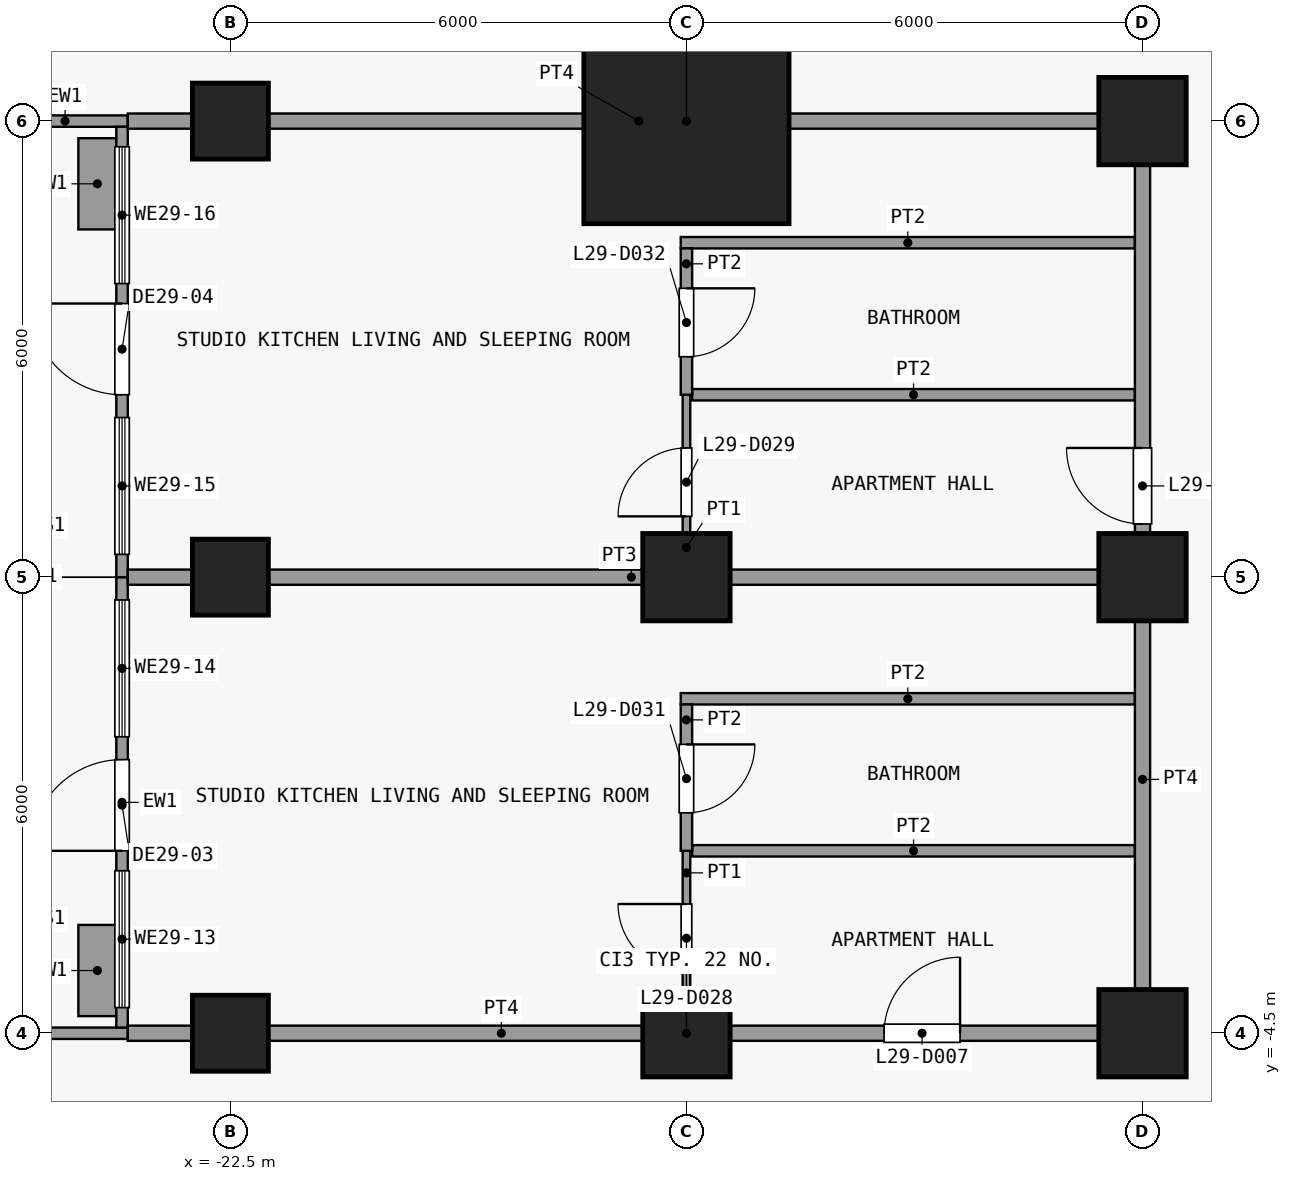
"""IFC4 building model, lengths in metres.
Left out: names, types, materials, properties, quantities, classifications, styles, units other than length and angle.
Written with IfcOpenShell. Run it as: python <this file> out.ifc"""

import sys

from ifc_helpers import new_model, si_unit, direction, frame, frame_2d, origin, origin_2d, place, context, subcontext, project, spatial, rectangle, extrude, element, fill, save


model = new_model("IFC4")
c1 = context("Model", 3, precision=1e-05, world=origin(), true_north=direction((0.0, 1.0)))
c2 = subcontext(c1, "Body", "Model", "MODEL_VIEW")
j1 = project(units=[si_unit("LENGTHUNIT", "METRE"), si_unit("PLANEANGLEUNIT", "RADIAN")], contexts=[c1])
p1 = place(None, origin())
s1 = spatial("IfcSite", under=j1, at=p1, CompositionType="ELEMENT")
p2 = place(p1, origin())
s2 = spatial("IfcBuilding", under=s1, at=p2, CompositionType="ELEMENT")
p3 = place(p2, frame((0.0, 0.0, 117.1)))
s3 = spatial("IfcBuildingStorey", under=s2, at=p3, CompositionType="ELEMENT", Elevation=117.1)
for number, where, z_axis, x_axis in (
    (1, (-22.5, -4.5, 0.0), (0.0, 0.0, 1.0), (1.0, 0.0, 0.0)),
    (2, (-22.5, 1.5, 0.0), (0.0, 0.0, 1.0), (1.0, 0.0, 0.0)),
    (3, (-22.5, 7.5, 0.0), (0.0, 0.0, 1.0), (1.0, 0.0, 0.0)),
):
    element("IfcColumn", number, at=place(p3, frame(where, z_axis=z_axis, x_axis=x_axis)), inside=s3, PredefinedType="COLUMN", context=c2, shape_type="SweptSolid", body=[
        extrude(rectangle(XDim=1.0, YDim=1.0, at=origin_2d()), origin(), (0.0, 0.0, 1.0), 3.6),
    ])
for number, where, z_axis, x_axis in (
    (4, (-16.5, -4.5, 0.0), (0.0, 0.0, 1.0), (1.0, 0.0, 0.0)),
    (5, (-16.5, 1.5, 0.0), (0.0, 0.0, 1.0), (1.0, 0.0, 0.0)),
):
    element("IfcColumn", number, at=place(p3, frame(where, z_axis=z_axis, x_axis=x_axis)), inside=s3, PredefinedType="COLUMN", context=c2, shape_type="SweptSolid", body=[
        extrude(rectangle(XDim=1.15, YDim=1.15, at=origin_2d()), origin(), (0.0, 0.0, 1.0), 3.6),
    ])
p4 = place(p3, frame((-16.5, 7.5, 0.0), z_axis=(0.0, 0.0, 1.0), x_axis=(1.0, 0.0, 0.0)))
e6 = element("IfcColumn", 6, at=p4, inside=s3, PredefinedType="COLUMN", context=c2, shape_type="SweptSolid", body=[
    extrude(rectangle(XDim=2.7, YDim=2.7, at=origin_2d()), origin(), (0.0, 0.0, 1.0), 3.6),
])
for number, where, z_axis, x_axis in (
    (7, (-10.5, -4.5, 0.0), (0.0, 0.0, 1.0), (1.0, 0.0, 0.0)),
    (8, (-10.5, 1.5, 0.0), (0.0, 0.0, 1.0), (1.0, 0.0, 0.0)),
    (9, (-10.5, 7.5, 0.0), (0.0, 0.0, 1.0), (1.0, 0.0, 0.0)),
):
    element("IfcColumn", number, at=place(p3, frame(where, z_axis=z_axis, x_axis=x_axis)), inside=s3, PredefinedType="COLUMN", context=c2, shape_type="SweptSolid", body=[
        extrude(rectangle(XDim=1.15, YDim=1.15, at=origin_2d()), origin(), (0.0, 0.0, 1.0), 3.6),
    ])
p5 = place(p3, frame((-23.85, -4.5, 0.0), z_axis=(0.0, 0.0, 1.0), x_axis=(-1.0, 0.0, 0.0)))
e10 = element("IfcWall", 10, at=p5, inside=s3, PredefinedType="SOLIDWALL", context=c2, shape_type="SweptSolid", body=[
    extrude(rectangle(XDim=2.55, YDim=0.15, at=frame_2d((1.275, 0.0))), origin(), (0.0, 0.0, 1.0), 3.3),
])
p6 = place(p3, frame((-23.925, -4.425, 0.0), z_axis=(0.0, 0.0, 1.0), x_axis=(0.0, 1.0, 0.0)))
e11 = element("IfcWall", 11, at=p6, inside=s3, PredefinedType="SOLIDWALL", context=c2, shape_type="SweptSolid", body=[
    extrude(rectangle(XDim=5.925, YDim=0.15, at=frame_2d((2.962, 0.0))), origin(), (0.0, 0.0, 1.0), 3.3),
])
p7 = place(p6, frame((2.325, 0.0, 0.0)))
e12 = element("IfcOpeningElement", 12, at=p7, cuts=e11, PredefinedType="OPENING", context=c2, shape_type="SweptSolid", body=[
    extrude(rectangle(XDim=1.2, YDim=2.4, at=frame_2d((0.6, 1.2))), frame((0.0, 0.085, 0.0), z_axis=(0.0, -1.0, 0.0), x_axis=(1.0, 0.0, 0.0)), (0.0, 0.0, 1.0), 0.17),
])
p8 = place(p6, frame((0.262, 0.0, 0.9)))
e13 = element("IfcOpeningElement", 13, at=p8, cuts=e11, PredefinedType="OPENING", context=c2, shape_type="SweptSolid", body=[
    extrude(rectangle(XDim=1.8, YDim=2.1, at=frame_2d((0.9, 1.05))), frame((0.0, 0.085, 0.0), z_axis=(0.0, -1.0, 0.0), x_axis=(1.0, 0.0, 0.0)), (0.0, 0.0, 1.0), 0.17),
])
p9 = place(p6, frame((3.825, 0.0, 0.9)))
e14 = element("IfcOpeningElement", 14, at=p9, cuts=e11, PredefinedType="OPENING", context=c2, shape_type="SweptSolid", body=[
    extrude(rectangle(XDim=1.8, YDim=2.1, at=frame_2d((0.9, 1.05))), frame((0.0, 0.085, 0.0), z_axis=(0.0, -1.0, 0.0), x_axis=(1.0, 0.0, 0.0)), (0.0, 0.0, 1.0), 0.17),
])
p10 = place(p3, frame((-24.25, -4.275, 0.0), z_axis=(0.0, 0.0, 1.0), x_axis=(0.0, 1.0, 0.0)))
e15 = element("IfcWall", 15, at=p10, inside=s3, PredefinedType="USERDEFINED", context=c2, shape_type="SweptSolid", body=[
    extrude(rectangle(XDim=1.2, YDim=0.5, at=frame_2d((0.6, 0.0))), origin(), (0.0, 0.0, 1.0), 0.9),
])
p11 = place(p3, frame((-23.85, 7.5, 0.0), z_axis=(0.0, 0.0, 1.0), x_axis=(-1.0, 0.0, 0.0)))
e16 = element("IfcWall", 16, at=p11, inside=s3, PredefinedType="SOLIDWALL", context=c2, shape_type="SweptSolid", body=[
    extrude(rectangle(XDim=1.65, YDim=0.15, at=frame_2d((0.825, 0.0))), origin(), (0.0, 0.0, 1.0), 3.3),
])
p12 = place(p3, frame((-23.925, 1.5, 0.0), z_axis=(0.0, 0.0, 1.0), x_axis=(0.0, 1.0, 0.0)))
e17 = element("IfcWall", 17, at=p12, inside=s3, PredefinedType="SOLIDWALL", context=c2, shape_type="SweptSolid", body=[
    extrude(rectangle(XDim=5.925, YDim=0.15, at=frame_2d((2.962, 0.0))), origin(), (0.0, 0.0, 1.0), 3.3),
])
p13 = place(p12, frame((2.4, 0.0, 0.0)))
e18 = element("IfcOpeningElement", 18, at=p13, cuts=e17, PredefinedType="OPENING", context=c2, shape_type="SweptSolid", body=[
    extrude(rectangle(XDim=1.2, YDim=2.4, at=frame_2d((0.6, 1.2))), frame((0.0, 0.085, 0.0), z_axis=(0.0, -1.0, 0.0), x_axis=(1.0, 0.0, 0.0)), (0.0, 0.0, 1.0), 0.17),
])
p14 = place(p12, frame((0.3, 0.0, 0.9)))
e19 = element("IfcOpeningElement", 19, at=p14, cuts=e17, PredefinedType="OPENING", context=c2, shape_type="SweptSolid", body=[
    extrude(rectangle(XDim=1.8, YDim=2.1, at=frame_2d((0.9, 1.05))), frame((0.0, 0.085, 0.0), z_axis=(0.0, -1.0, 0.0), x_axis=(1.0, 0.0, 0.0)), (0.0, 0.0, 1.0), 0.17),
])
p15 = place(p12, frame((3.863, 0.0, 0.9)))
e20 = element("IfcOpeningElement", 20, at=p15, cuts=e17, PredefinedType="OPENING", context=c2, shape_type="SweptSolid", body=[
    extrude(rectangle(XDim=1.8, YDim=2.1, at=frame_2d((0.9, 1.05))), frame((0.0, 0.085, 0.0), z_axis=(0.0, -1.0, 0.0), x_axis=(1.0, 0.0, 0.0)), (0.0, 0.0, 1.0), 0.17),
])
p16 = place(p3, frame((-24.25, 6.075, 0.0), z_axis=(0.0, 0.0, 1.0), x_axis=(0.0, 1.0, 0.0)))
e21 = element("IfcWall", 21, at=p16, inside=s3, PredefinedType="USERDEFINED", context=c2, shape_type="SweptSolid", body=[
    extrude(rectangle(XDim=1.2, YDim=0.5, at=frame_2d((0.6, 0.0))), origin(), (0.0, 0.0, 1.0), 0.9),
])
p17 = place(p3, frame((-23.85, -4.5, 0.0), z_axis=(0.0, 0.0, 1.0), x_axis=(1.0, 0.0, 0.0)))
e22 = element("IfcWall", 22, at=p17, inside=s3, PredefinedType="PARTITIONING", context=c2, shape_type="SweptSolid", body=[
    extrude(rectangle(XDim=13.45, YDim=0.2, at=frame_2d((6.725, 0.0))), origin(), (0.0, 0.0, 1.0), 3.3),
])
p18 = place(p17, frame((9.95, 0.0, 0.0)))
e23 = element("IfcOpeningElement", 23, at=p18, cuts=e22, PredefinedType="OPENING", context=c2, shape_type="SweptSolid", body=[
    extrude(rectangle(XDim=1.0, YDim=2.1, at=frame_2d((0.5, 1.05))), frame((0.0, 0.11, 0.0), z_axis=(0.0, -1.0, 0.0), x_axis=(1.0, 0.0, 0.0)), (0.0, 0.0, 1.0), 0.22),
])
p19 = place(p3, frame((-16.425, -2.1, 0.0), z_axis=(0.0, 0.0, 1.0), x_axis=(1.0, 0.0, 0.0)))
e24 = element("IfcWall", 24, at=p19, inside=s3, PredefinedType="PARTITIONING", context=c2, shape_type="SweptSolid", body=[
    extrude(rectangle(XDim=5.825, YDim=0.15, at=frame_2d((2.913, 0.0))), origin(), (0.0, 0.0, 1.0), 3.3),
])
p20 = place(p3, frame((-16.575, -0.1, 0.0), z_axis=(0.0, 0.0, 1.0), x_axis=(1.0, 0.0, 0.0)))
e25 = element("IfcWall", 25, at=p20, inside=s3, PredefinedType="PARTITIONING", context=c2, shape_type="SweptSolid", body=[
    extrude(rectangle(XDim=5.975, YDim=0.15, at=frame_2d((2.987, 0.0))), origin(), (0.0, 0.0, 1.0), 3.3),
])
p21 = place(p3, frame((-23.85, 1.5, 0.0), z_axis=(0.0, 0.0, 1.0), x_axis=(1.0, 0.0, 0.0)))
e26 = element("IfcWall", 26, at=p21, inside=s3, PredefinedType="PARTITIONING", context=c2, shape_type="SweptSolid", body=[
    extrude(rectangle(XDim=13.25, YDim=0.2, at=frame_2d((6.625, 0.0))), origin(), (0.0, 0.0, 1.0), 3.3),
])
p22 = place(p3, frame((-16.425, 3.9, 0.0), z_axis=(0.0, 0.0, 1.0), x_axis=(1.0, 0.0, 0.0)))
e27 = element("IfcWall", 27, at=p22, inside=s3, PredefinedType="PARTITIONING", context=c2, shape_type="SweptSolid", body=[
    extrude(rectangle(XDim=5.825, YDim=0.15, at=frame_2d((2.913, 0.0))), origin(), (0.0, 0.0, 1.0), 3.3),
])
p23 = place(p3, frame((-16.575, 5.9, 0.0), z_axis=(0.0, 0.0, 1.0), x_axis=(1.0, 0.0, 0.0)))
e28 = element("IfcWall", 28, at=p23, inside=s3, PredefinedType="PARTITIONING", context=c2, shape_type="SweptSolid", body=[
    extrude(rectangle(XDim=5.975, YDim=0.15, at=frame_2d((2.987, 0.0))), origin(), (0.0, 0.0, 1.0), 3.3),
])
p24 = place(p3, frame((-23.85, 7.5, 0.0), z_axis=(0.0, 0.0, 1.0), x_axis=(1.0, 0.0, 0.0)))
e29 = element("IfcWall", 29, at=p24, inside=s3, PredefinedType="PARTITIONING", context=c2, shape_type="SweptSolid", body=[
    extrude(rectangle(XDim=13.45, YDim=0.2, at=frame_2d((6.725, 0.0))), origin(), (0.0, 0.0, 1.0), 3.3),
])
p25 = place(p3, frame((-16.5, -4.4, 0.0), z_axis=(0.0, 0.0, 1.0), x_axis=(0.0, 1.0, 0.0)))
e30 = element("IfcWall", 30, at=p25, inside=s3, PredefinedType="PARTITIONING", context=c2, shape_type="SweptSolid", body=[
    extrude(rectangle(XDim=2.3, YDim=0.1, at=frame_2d((1.15, 0.0))), origin(), (0.0, 0.0, 1.0), 3.3),
])
p26 = place(p25, frame((0.7, 0.0, 0.0)))
e31 = element("IfcOpeningElement", 31, at=p26, cuts=e30, PredefinedType="OPENING", context=c2, shape_type="SweptSolid", body=[
    extrude(rectangle(XDim=0.9, YDim=2.1, at=frame_2d((0.45, 1.05))), frame((0.0, 0.06, 0.0), z_axis=(0.0, -1.0, 0.0), x_axis=(1.0, 0.0, 0.0)), (0.0, 0.0, 1.0), 0.12),
])
p27 = place(p3, frame((-16.5, 1.6, 0.0), z_axis=(0.0, 0.0, 1.0), x_axis=(0.0, 1.0, 0.0)))
e32 = element("IfcWall", 32, at=p27, inside=s3, PredefinedType="PARTITIONING", context=c2, shape_type="SweptSolid", body=[
    extrude(rectangle(XDim=2.3, YDim=0.1, at=frame_2d((1.15, 0.0))), origin(), (0.0, 0.0, 1.0), 3.3),
])
p28 = place(p27, frame((0.7, 0.0, 0.0)))
e33 = element("IfcOpeningElement", 33, at=p28, cuts=e32, PredefinedType="OPENING", context=c2, shape_type="SweptSolid", body=[
    extrude(rectangle(XDim=0.9, YDim=2.1, at=frame_2d((0.45, 1.05))), frame((0.0, 0.06, 0.0), z_axis=(0.0, -1.0, 0.0), x_axis=(1.0, 0.0, 0.0)), (0.0, 0.0, 1.0), 0.12),
])
p29 = place(p3, frame((-16.5, -2.1, 0.0), z_axis=(0.0, 0.0, 1.0), x_axis=(0.0, 1.0, 0.0)))
e34 = element("IfcWall", 34, at=p29, inside=s3, PredefinedType="PARTITIONING", context=c2, shape_type="SweptSolid", body=[
    extrude(rectangle(XDim=1.925, YDim=0.15, at=frame_2d((0.962, 0.0))), origin(), (0.0, 0.0, 1.0), 3.3),
])
p30 = place(p29, frame((0.5, 0.0, 0.0)))
e35 = element("IfcOpeningElement", 35, at=p30, cuts=e34, PredefinedType="OPENING", context=c2, shape_type="SweptSolid", body=[
    extrude(rectangle(XDim=0.9, YDim=2.1, at=frame_2d((0.45, 1.05))), frame((0.0, 0.085, 0.0), z_axis=(0.0, -1.0, 0.0), x_axis=(1.0, 0.0, 0.0)), (0.0, 0.0, 1.0), 0.17),
])
p31 = place(p3, frame((-16.5, 3.9, 0.0), z_axis=(0.0, 0.0, 1.0), x_axis=(0.0, 1.0, 0.0)))
e36 = element("IfcWall", 36, at=p31, inside=s3, PredefinedType="PARTITIONING", context=c2, shape_type="SweptSolid", body=[
    extrude(rectangle(XDim=1.925, YDim=0.15, at=frame_2d((0.962, 0.0))), origin(), (0.0, 0.0, 1.0), 3.3),
])
p32 = place(p31, frame((0.5, 0.0, 0.0)))
e37 = element("IfcOpeningElement", 37, at=p32, cuts=e36, PredefinedType="OPENING", context=c2, shape_type="SweptSolid", body=[
    extrude(rectangle(XDim=0.9, YDim=2.1, at=frame_2d((0.45, 1.05))), frame((0.0, 0.085, 0.0), z_axis=(0.0, -1.0, 0.0), x_axis=(1.0, 0.0, 0.0)), (0.0, 0.0, 1.0), 0.17),
])
p33 = place(p3, frame((-10.5, -4.4, 0.0), z_axis=(0.0, 0.0, 1.0), x_axis=(0.0, 1.0, 0.0)))
e38 = element("IfcWall", 38, at=p33, inside=s3, PredefinedType="PARTITIONING", context=c2, shape_type="SweptSolid", body=[
    extrude(rectangle(XDim=11.8, YDim=0.2, at=frame_2d((5.9, 0.0))), origin(), (0.0, 0.0, 1.0), 3.3),
])
p34 = place(p33, frame((6.6, 0.0, 0.0)))
e39 = element("IfcOpeningElement", 39, at=p34, cuts=e38, PredefinedType="OPENING", context=c2, shape_type="SweptSolid", body=[
    extrude(rectangle(XDim=1.0, YDim=2.1, at=frame_2d((0.5, 1.05))), frame((0.0, 0.11, 0.0), z_axis=(0.0, -1.0, 0.0), x_axis=(1.0, 0.0, 0.0)), (0.0, 0.0, 1.0), 0.22),
])
p35 = place(p7, origin())
e40 = element("IfcDoor", 40, at=p35, inside=s3, OperationType="SINGLE_SWING_LEFT", PredefinedType="DOOR", context=c2, shape_type="SweptSolid", body=[
    extrude(rectangle(XDim=1.2, YDim=2.4, at=frame_2d((0.6, 1.2))), frame((0.0, 0.025, 0.0), z_axis=(0.0, -1.0, 0.0), x_axis=(1.0, 0.0, 0.0)), (0.0, 0.0, 1.0), 0.05),
])
fill(e12, e40)
p36 = place(p8, origin())
e41 = element("IfcWindow", 41, at=p36, inside=s3, PartitioningType="SINGLE_PANEL", PredefinedType="WINDOW", context=c2, shape_type="SweptSolid", body=[
    extrude(rectangle(XDim=1.8, YDim=2.1, at=frame_2d((0.9, 1.05))), frame((0.0, 0.03, 0.0), z_axis=(0.0, -1.0, 0.0), x_axis=(1.0, 0.0, 0.0)), (0.0, 0.0, 1.0), 0.06),
])
fill(e13, e41)
p37 = place(p9, origin())
e42 = element("IfcWindow", 42, at=p37, inside=s3, PartitioningType="SINGLE_PANEL", PredefinedType="WINDOW", context=c2, shape_type="SweptSolid", body=[
    extrude(rectangle(XDim=1.8, YDim=2.1, at=frame_2d((0.9, 1.05))), frame((0.0, 0.03, 0.0), z_axis=(0.0, -1.0, 0.0), x_axis=(1.0, 0.0, 0.0)), (0.0, 0.0, 1.0), 0.06),
])
fill(e14, e42)
p38 = place(p13, origin())
e43 = element("IfcDoor", 43, at=p38, inside=s3, OperationType="SINGLE_SWING_RIGHT", PredefinedType="DOOR", context=c2, shape_type="SweptSolid", body=[
    extrude(rectangle(XDim=1.2, YDim=2.4, at=frame_2d((0.6, 1.2))), frame((0.0, 0.025, 0.0), z_axis=(0.0, -1.0, 0.0), x_axis=(1.0, 0.0, 0.0)), (0.0, 0.0, 1.0), 0.05),
])
fill(e18, e43)
p39 = place(p14, origin())
e44 = element("IfcWindow", 44, at=p39, inside=s3, PartitioningType="SINGLE_PANEL", PredefinedType="WINDOW", context=c2, shape_type="SweptSolid", body=[
    extrude(rectangle(XDim=1.8, YDim=2.1, at=frame_2d((0.9, 1.05))), frame((0.0, 0.03, 0.0), z_axis=(0.0, -1.0, 0.0), x_axis=(1.0, 0.0, 0.0)), (0.0, 0.0, 1.0), 0.06),
])
fill(e19, e44)
p40 = place(p15, origin())
e45 = element("IfcWindow", 45, at=p40, inside=s3, PartitioningType="SINGLE_PANEL", PredefinedType="WINDOW", context=c2, shape_type="SweptSolid", body=[
    extrude(rectangle(XDim=1.8, YDim=2.1, at=frame_2d((0.9, 1.05))), frame((0.0, 0.03, 0.0), z_axis=(0.0, -1.0, 0.0), x_axis=(1.0, 0.0, 0.0)), (0.0, 0.0, 1.0), 0.06),
])
fill(e20, e45)
p41 = place(p18, origin())
e46 = element("IfcDoor", 46, at=p41, inside=s3, OperationType="SINGLE_SWING_LEFT", PredefinedType="DOOR", context=c2, shape_type="SweptSolid", body=[
    extrude(rectangle(XDim=1.0, YDim=2.1, at=frame_2d((0.5, 1.05))), frame((0.0, 0.025, 0.0), z_axis=(0.0, -1.0, 0.0), x_axis=(1.0, 0.0, 0.0)), (0.0, 0.0, 1.0), 0.05),
])
fill(e23, e46)
p42 = place(p26, origin())
e47 = element("IfcDoor", 47, at=p42, inside=s3, OperationType="SINGLE_SWING_LEFT", PredefinedType="DOOR", context=c2, shape_type="SweptSolid", body=[
    extrude(rectangle(XDim=0.9, YDim=2.1, at=frame_2d((0.45, 1.05))), frame((0.0, 0.025, 0.0), z_axis=(0.0, -1.0, 0.0), x_axis=(1.0, 0.0, 0.0)), (0.0, 0.0, 1.0), 0.05),
])
fill(e31, e47)
p43 = place(p28, origin())
e48 = element("IfcDoor", 48, at=p43, inside=s3, OperationType="SINGLE_SWING_RIGHT", PredefinedType="DOOR", context=c2, shape_type="SweptSolid", body=[
    extrude(rectangle(XDim=0.9, YDim=2.1, at=frame_2d((0.45, 1.05))), frame((0.0, 0.025, 0.0), z_axis=(0.0, -1.0, 0.0), x_axis=(1.0, 0.0, 0.0)), (0.0, 0.0, 1.0), 0.05),
])
fill(e33, e48)
p44 = place(p30, origin())
e49 = element("IfcDoor", 49, at=p44, inside=s3, OperationType="SINGLE_SWING_RIGHT", PredefinedType="DOOR", context=c2, shape_type="SweptSolid", body=[
    extrude(rectangle(XDim=0.9, YDim=2.1, at=frame_2d((0.45, 1.05))), frame((0.0, 0.025, 0.0), z_axis=(0.0, -1.0, 0.0), x_axis=(1.0, 0.0, 0.0)), (0.0, 0.0, 1.0), 0.05),
])
fill(e35, e49)
p45 = place(p32, origin())
e50 = element("IfcDoor", 50, at=p45, inside=s3, OperationType="SINGLE_SWING_RIGHT", PredefinedType="DOOR", context=c2, shape_type="SweptSolid", body=[
    extrude(rectangle(XDim=0.9, YDim=2.1, at=frame_2d((0.45, 1.05))), frame((0.0, 0.025, 0.0), z_axis=(0.0, -1.0, 0.0), x_axis=(1.0, 0.0, 0.0)), (0.0, 0.0, 1.0), 0.05),
])
fill(e37, e50)
p46 = place(p34, origin())
e51 = element("IfcDoor", 51, at=p46, inside=s3, OperationType="SINGLE_SWING_LEFT", PredefinedType="DOOR", context=c2, shape_type="SweptSolid", body=[
    extrude(rectangle(XDim=1.0, YDim=2.1, at=frame_2d((0.5, 1.05))), frame((0.0, 0.025, 0.0), z_axis=(0.0, -1.0, 0.0), x_axis=(1.0, 0.0, 0.0)), (0.0, 0.0, 1.0), 0.05),
])
fill(e39, e51)
save(model, sys.argv[1])
